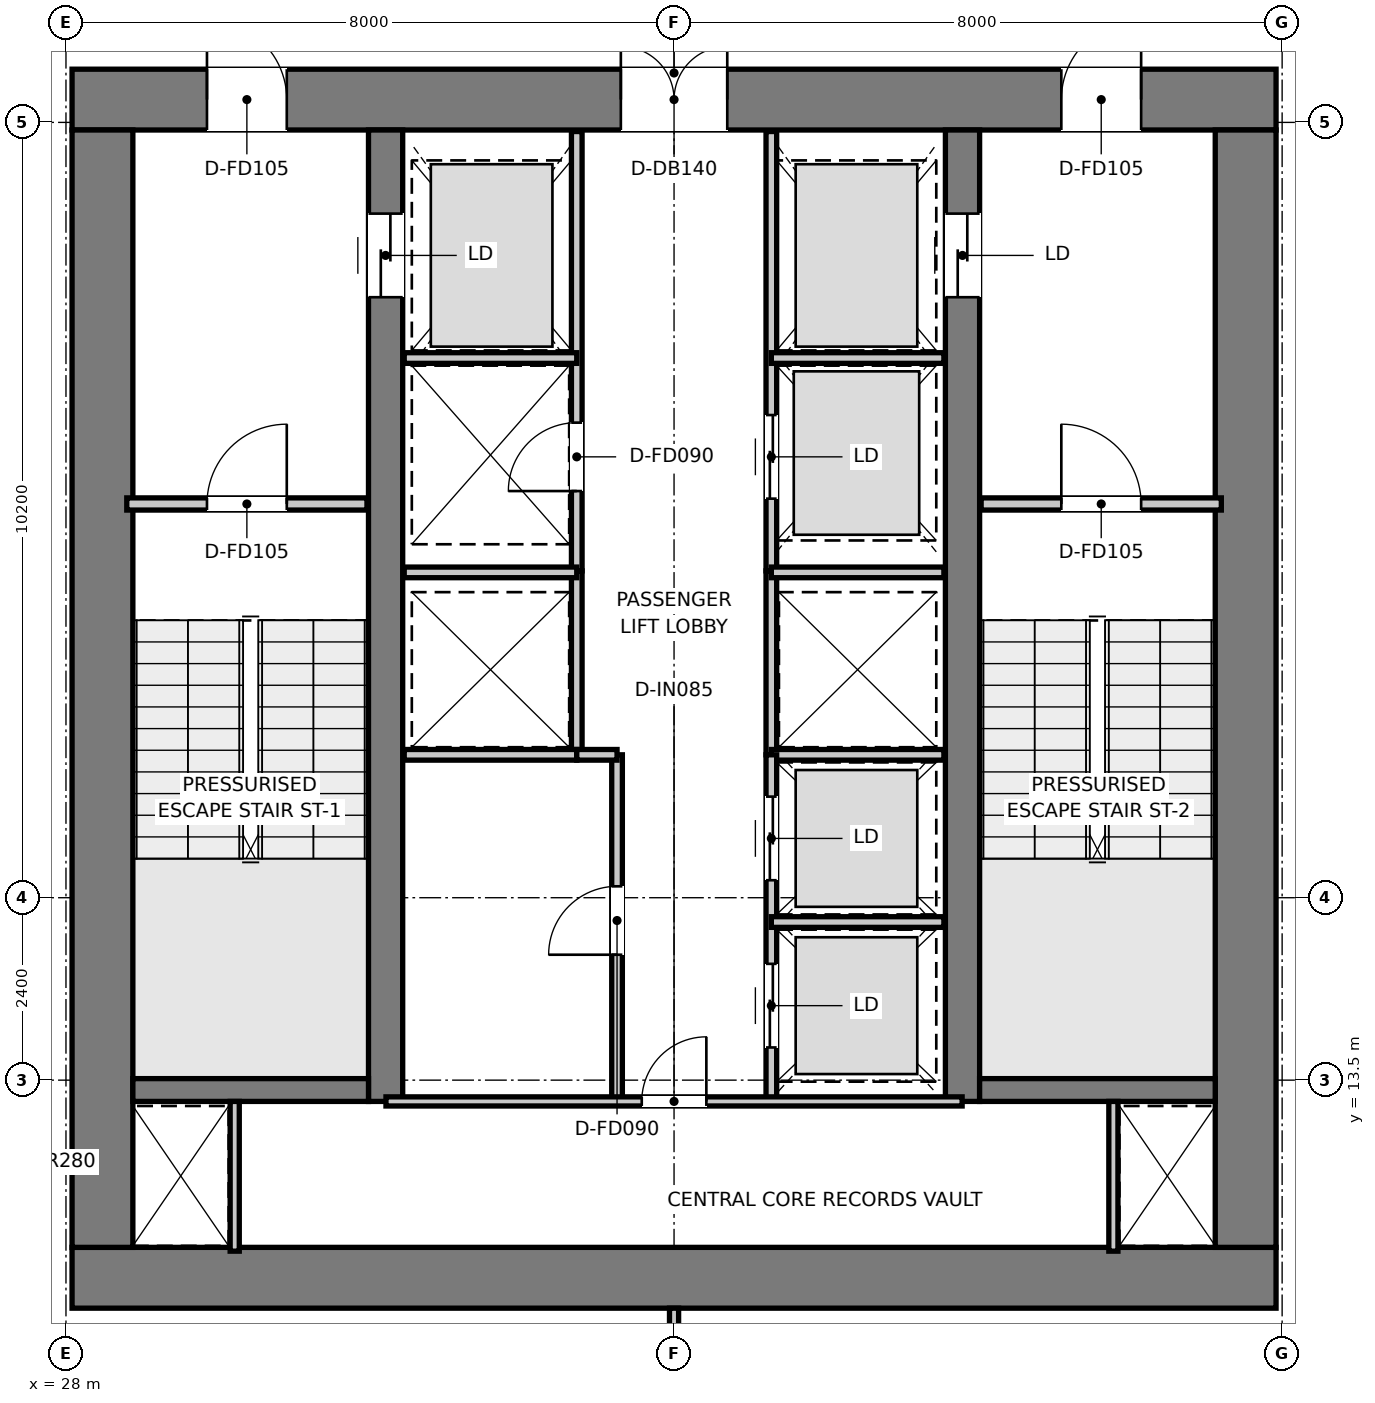
"""IFC4 building model, lengths in metres.
Left out: names, types, materials, properties, quantities, classifications, styles, units other than length and angle.
Written with IfcOpenShell. Run it as: python <this file> out.ifc"""

import sys

from ifc_helpers import new_model, si_unit, direction, frame, frame_2d, origin, place, context, subcontext, project, spatial, rectangle, extrude, element, fill, save


model = new_model("IFC4")
c1 = context("Model", 3, precision=1e-05, world=origin(), true_north=direction((0.0, 1.0)))
c2 = subcontext(c1, "Body", "Model", "MODEL_VIEW")
j1 = project(units=[si_unit("LENGTHUNIT", "METRE"), si_unit("PLANEANGLEUNIT", "RADIAN")], contexts=[c1])
p1 = place(None, origin())
s1 = spatial("IfcSite", under=j1, at=p1, CompositionType="ELEMENT")
p2 = place(p1, origin())
s2 = spatial("IfcBuilding", under=s1, at=p2, CompositionType="ELEMENT")
p3 = place(p2, frame((0.0, 0.0, 242.85)))
s3 = spatial("IfcBuildingStorey", under=s2, at=p3, CompositionType="ELEMENT", Elevation=242.85)
p4 = place(p3, frame((28.08, 10.9, 0.0), z_axis=(0.0, 0.0, 1.0), x_axis=(1.0, 0.0, 0.0)))
e1 = element("IfcWall", 1, at=p4, inside=s3, PredefinedType="SHEAR", context=c2, shape_type="SweptSolid", body=[
    extrude(rectangle(XDim=15.84, YDim=0.8, at=frame_2d((7.92, 0.0))), origin(), (0.0, 0.0, 1.0), 3.95),
])
p5 = place(p3, frame((28.08, 26.4, 0.0), z_axis=(0.0, 0.0, 1.0), x_axis=(1.0, 0.0, 0.0)))
e2 = element("IfcWall", 2, at=p5, inside=s3, PredefinedType="SHEAR", context=c2, shape_type="SweptSolid", body=[
    extrude(rectangle(XDim=15.84, YDim=0.8, at=frame_2d((7.92, 0.0))), origin(), (0.0, 0.0, 1.0), 3.95),
])
p6 = place(p5, frame((7.22, 0.0, 0.0)))
e3 = element("IfcOpeningElement", 3, at=p6, cuts=e2, PredefinedType="OPENING", context=c2, shape_type="SweptSolid", body=[
    extrude(rectangle(XDim=1.4, YDim=2.2, at=frame_2d((0.7, 1.1))), frame((0.0, 0.41, 0.0), z_axis=(0.0, -1.0, 0.0), x_axis=(1.0, 0.0, 0.0)), (0.0, 0.0, 1.0), 0.82),
])
p7 = place(p5, frame((1.775, 0.0, 0.0)))
e4 = element("IfcOpeningElement", 4, at=p7, cuts=e2, PredefinedType="OPENING", context=c2, shape_type="SweptSolid", body=[
    extrude(rectangle(XDim=1.05, YDim=2.1, at=frame_2d((0.525, 1.05))), frame((0.0, 0.41, 0.0), z_axis=(0.0, -1.0, 0.0), x_axis=(1.0, 0.0, 0.0)), (0.0, 0.0, 1.0), 0.82),
])
p8 = place(p5, frame((13.015, 0.0, 0.0)))
e5 = element("IfcOpeningElement", 5, at=p8, cuts=e2, PredefinedType="OPENING", context=c2, shape_type="SweptSolid", body=[
    extrude(rectangle(XDim=1.05, YDim=2.1, at=frame_2d((0.525, 1.05))), frame((0.0, 0.41, 0.0), z_axis=(0.0, -1.0, 0.0), x_axis=(1.0, 0.0, 0.0)), (0.0, 0.0, 1.0), 0.82),
])
for number, where, z_axis, x_axis in (
    (6, (28.48, 11.3, 0.0), (0.0, 0.0, 1.0), (0.0, 1.0, 0.0)),
    (7, (43.52, 11.3, 0.0), (0.0, 0.0, 1.0), (0.0, 1.0, 0.0)),
):
    element("IfcWall", number, at=place(p3, frame(where, z_axis=z_axis, x_axis=x_axis)), inside=s3, PredefinedType="SHEAR", context=c2, shape_type="SweptSolid", body=[
        extrude(rectangle(XDim=14.7, YDim=0.8, at=frame_2d((7.35, 0.0))), origin(), (0.0, 0.0, 1.0), 3.95),
    ])
p9 = place(p3, frame((32.205, 13.22, 0.0), z_axis=(0.0, 0.0, 1.0), x_axis=(0.0, 1.0, 0.0)))
e8 = element("IfcWall", 8, at=p9, inside=s3, PredefinedType="SHEAR", context=c2, shape_type="SweptSolid", body=[
    extrude(rectangle(XDim=12.78, YDim=0.45, at=frame_2d((6.39, 0.0))), origin(), (0.0, 0.0, 1.0), 3.95),
])
p10 = place(p9, frame((10.58, 0.0, 0.0)))
e9 = element("IfcOpeningElement", 9, at=p10, cuts=e8, PredefinedType="OPENING", context=c2, shape_type="SweptSolid", body=[
    extrude(rectangle(XDim=1.1, YDim=2.15, at=frame_2d((0.55, 1.075))), frame((0.0, 0.235, 0.0), z_axis=(0.0, -1.0, 0.0), x_axis=(1.0, 0.0, 0.0)), (0.0, 0.0, 1.0), 0.47),
])
p11 = place(p3, frame((39.795, 13.22, 0.0), z_axis=(0.0, 0.0, 1.0), x_axis=(0.0, 1.0, 0.0)))
e10 = element("IfcWall", 10, at=p11, inside=s3, PredefinedType="SHEAR", context=c2, shape_type="SweptSolid", body=[
    extrude(rectangle(XDim=12.78, YDim=0.45, at=frame_2d((6.39, 0.0))), origin(), (0.0, 0.0, 1.0), 3.95),
])
p12 = place(p11, frame((10.58, 0.0, 0.0)))
e11 = element("IfcOpeningElement", 11, at=p12, cuts=e10, PredefinedType="OPENING", context=c2, shape_type="SweptSolid", body=[
    extrude(rectangle(XDim=1.1, YDim=2.15, at=frame_2d((0.55, 1.075))), frame((0.0, 0.235, 0.0), z_axis=(0.0, -1.0, 0.0), x_axis=(1.0, 0.0, 0.0)), (0.0, 0.0, 1.0), 0.47),
])
for number, where, z_axis, x_axis in (
    (12, (28.88, 13.37, 0.0), (0.0, 0.0, 1.0), (1.0, 0.0, 0.0)),
    (13, (40.02, 13.37, 0.0), (0.0, 0.0, 1.0), (1.0, 0.0, 0.0)),
):
    element("IfcWall", number, at=place(p3, frame(where, z_axis=z_axis, x_axis=x_axis)), inside=s3, PredefinedType="SHEAR", context=c2, shape_type="SweptSolid", body=[
        extrude(rectangle(XDim=3.1, YDim=0.3, at=frame_2d((1.55, 0.0))), origin(), (0.0, 0.0, 1.0), 3.95),
    ])
p13 = place(p3, frame((28.8, 21.08, 0.0), z_axis=(0.0, 0.0, 1.0), x_axis=(1.0, 0.0, 0.0)))
e14 = element("IfcWall", 14, at=p13, inside=s3, PredefinedType="PARTITIONING", context=c2, shape_type="SweptSolid", body=[
    extrude(rectangle(XDim=3.16, YDim=0.16, at=frame_2d((1.58, 0.0))), origin(), (0.0, 0.0, 1.0), 3.67),
])
p14 = place(p13, frame((1.055, 0.0, 0.0)))
e15 = element("IfcOpeningElement", 15, at=p14, cuts=e14, PredefinedType="OPENING", context=c2, shape_type="SweptSolid", body=[
    extrude(rectangle(XDim=1.05, YDim=2.1, at=frame_2d((0.525, 1.05))), frame((0.0, 0.09, 0.0), z_axis=(0.0, -1.0, 0.0), x_axis=(1.0, 0.0, 0.0)), (0.0, 0.0, 1.0), 0.18),
])
p15 = place(p3, frame((40.04, 21.08, 0.0), z_axis=(0.0, 0.0, 1.0), x_axis=(1.0, 0.0, 0.0)))
e16 = element("IfcWall", 16, at=p15, inside=s3, PredefinedType="PARTITIONING", context=c2, shape_type="SweptSolid", body=[
    extrude(rectangle(XDim=3.16, YDim=0.16, at=frame_2d((1.58, 0.0))), origin(), (0.0, 0.0, 1.0), 3.67),
])
p16 = place(p15, frame((1.055, 0.0, 0.0)))
e17 = element("IfcOpeningElement", 17, at=p16, cuts=e16, PredefinedType="OPENING", context=c2, shape_type="SweptSolid", body=[
    extrude(rectangle(XDim=1.05, YDim=2.1, at=frame_2d((0.525, 1.05))), frame((0.0, 0.09, 0.0), z_axis=(0.0, -1.0, 0.0), x_axis=(1.0, 0.0, 0.0)), (0.0, 0.0, 1.0), 0.18),
])
p17 = place(p3, frame((34.72, 20.2, 0.0), z_axis=(0.0, 0.0, 1.0), x_axis=(0.0, 1.0, 0.0)))
e18 = element("IfcWall", 18, at=p17, inside=s3, PredefinedType="PARTITIONING", context=c2, shape_type="SweptSolid", body=[
    extrude(rectangle(XDim=5.78, YDim=0.14, at=frame_2d((2.89, 0.0))), origin(), (0.0, 0.0, 1.0), 2.82),
])
p18 = place(p17, frame((1.05, 0.0, 0.0)))
e19 = element("IfcOpeningElement", 19, at=p18, cuts=e18, PredefinedType="OPENING", context=c2, shape_type="SweptSolid", body=[
    extrude(rectangle(XDim=0.9, YDim=2.1, at=frame_2d((0.45, 1.05))), frame((0.0, 0.08, 0.0), z_axis=(0.0, -1.0, 0.0), x_axis=(1.0, 0.0, 0.0)), (0.0, 0.0, 1.0), 0.16),
])
p19 = place(p3, frame((37.28, 20.2, 0.0), z_axis=(0.0, 0.0, 1.0), x_axis=(0.0, 1.0, 0.0)))
e20 = element("IfcWall", 20, at=p19, inside=s3, PredefinedType="PARTITIONING", context=c2, shape_type="SweptSolid", body=[
    extrude(rectangle(XDim=5.78, YDim=0.14, at=frame_2d((2.89, 0.0))), origin(), (0.0, 0.0, 1.0), 2.82),
])
p20 = place(p19, frame((0.95, 0.0, 0.0)))
e21 = element("IfcOpeningElement", 21, at=p20, cuts=e20, PredefinedType="OPENING", context=c2, shape_type="SweptSolid", body=[
    extrude(rectangle(XDim=1.1, YDim=2.15, at=frame_2d((0.55, 1.075))), frame((0.0, 0.08, 0.0), z_axis=(0.0, -1.0, 0.0), x_axis=(1.0, 0.0, 0.0)), (0.0, 0.0, 1.0), 0.16),
])
for number, where, z_axis, x_axis in (
    (22, (32.45, 23.0, 0.0), (0.0, 0.0, 1.0), (1.0, 0.0, 0.0)),
    (23, (37.28, 23.0, 0.0), (0.0, 0.0, 1.0), (1.0, 0.0, 0.0)),
):
    element("IfcWall", number, at=place(p3, frame(where, z_axis=z_axis, x_axis=x_axis)), inside=s3, PredefinedType="PARTITIONING", context=c2, shape_type="SweptSolid", body=[
        extrude(rectangle(XDim=2.27, YDim=0.14, at=frame_2d((1.135, 0.0))), origin(), (0.0, 0.0, 1.0), 2.82),
    ])
for number, where, z_axis, x_axis in (
    (24, (34.72, 17.78, 0.0), (0.0, 0.0, 1.0), (0.0, 1.0, 0.0)),
    (25, (37.28, 17.78, 0.0), (0.0, 0.0, 1.0), (0.0, 1.0, 0.0)),
):
    element("IfcWall", number, at=place(p3, frame(where, z_axis=z_axis, x_axis=x_axis)), inside=s3, PredefinedType="PARTITIONING", context=c2, shape_type="SweptSolid", body=[
        extrude(rectangle(XDim=2.42, YDim=0.14, at=frame_2d((1.21, 0.0))), origin(), (0.0, 0.0, 1.0), 3.67),
    ])
for number, where, z_axis, x_axis in (
    (26, (32.45, 17.78, 0.0), (0.0, 0.0, 1.0), (1.0, 0.0, 0.0)),
    (27, (32.45, 20.18, 0.0), (0.0, 0.0, 1.0), (1.0, 0.0, 0.0)),
    (28, (37.28, 17.78, 0.0), (0.0, 0.0, 1.0), (1.0, 0.0, 0.0)),
    (29, (37.28, 20.18, 0.0), (0.0, 0.0, 1.0), (1.0, 0.0, 0.0)),
):
    element("IfcWall", number, at=place(p3, frame(where, z_axis=z_axis, x_axis=x_axis)), inside=s3, PredefinedType="PARTITIONING", context=c2, shape_type="SweptSolid", body=[
        extrude(rectangle(XDim=2.27, YDim=0.14, at=frame_2d((1.135, 0.0))), origin(), (0.0, 0.0, 1.0), 3.67),
    ])
p21 = place(p3, frame((35.25, 13.22, 0.0), z_axis=(0.0, 0.0, 1.0), x_axis=(0.0, 1.0, 0.0)))
e30 = element("IfcWall", 30, at=p21, inside=s3, PredefinedType="PARTITIONING", context=c2, shape_type="SweptSolid", body=[
    extrude(rectangle(XDim=4.56, YDim=0.14, at=frame_2d((2.28, 0.0))), origin(), (0.0, 0.0, 1.0), 3.67),
])
p22 = place(p21, frame((1.93, 0.0, 0.0)))
e31 = element("IfcOpeningElement", 31, at=p22, cuts=e30, PredefinedType="OPENING", context=c2, shape_type="SweptSolid", body=[
    extrude(rectangle(XDim=0.9, YDim=2.1, at=frame_2d((0.45, 1.05))), frame((0.0, 0.08, 0.0), z_axis=(0.0, -1.0, 0.0), x_axis=(1.0, 0.0, 0.0)), (0.0, 0.0, 1.0), 0.16),
])
p23 = place(p3, frame((34.72, 17.78, 0.0), z_axis=(0.0, 0.0, 1.0), x_axis=(1.0, 0.0, 0.0)))
e32 = element("IfcWall", 32, at=p23, inside=s3, PredefinedType="PARTITIONING", context=c2, shape_type="SweptSolid", body=[
    extrude(rectangle(XDim=0.53, YDim=0.14, at=frame_2d((0.265, 0.0))), origin(), (0.0, 0.0, 1.0), 3.67),
])
p24 = place(p3, frame((37.28, 13.22, 0.0), z_axis=(0.0, 0.0, 1.0), x_axis=(0.0, 1.0, 0.0)))
e33 = element("IfcWall", 33, at=p24, inside=s3, PredefinedType="PARTITIONING", context=c2, shape_type="SweptSolid", body=[
    extrude(rectangle(XDim=4.56, YDim=0.14, at=frame_2d((2.28, 0.0))), origin(), (0.0, 0.0, 1.0), 3.67),
])
p25 = place(p24, frame((0.71, 0.0, 0.0)))
e34 = element("IfcOpeningElement", 34, at=p25, cuts=e33, PredefinedType="OPENING", context=c2, shape_type="SweptSolid", body=[
    extrude(rectangle(XDim=1.1, YDim=2.15, at=frame_2d((0.55, 1.075))), frame((0.0, 0.08, 0.0), z_axis=(0.0, -1.0, 0.0), x_axis=(1.0, 0.0, 0.0)), (0.0, 0.0, 1.0), 0.16),
])
p26 = place(p24, frame((2.91, 0.0, 0.0)))
e35 = element("IfcOpeningElement", 35, at=p26, cuts=e33, PredefinedType="OPENING", context=c2, shape_type="SweptSolid", body=[
    extrude(rectangle(XDim=1.1, YDim=2.15, at=frame_2d((0.55, 1.075))), frame((0.0, 0.08, 0.0), z_axis=(0.0, -1.0, 0.0), x_axis=(1.0, 0.0, 0.0)), (0.0, 0.0, 1.0), 0.16),
])
p27 = place(p3, frame((37.28, 15.58, 0.0), z_axis=(0.0, 0.0, 1.0), x_axis=(1.0, 0.0, 0.0)))
e36 = element("IfcWall", 36, at=p27, inside=s3, PredefinedType="PARTITIONING", context=c2, shape_type="SweptSolid", body=[
    extrude(rectangle(XDim=2.27, YDim=0.14, at=frame_2d((1.135, 0.0))), origin(), (0.0, 0.0, 1.0), 3.67),
])
for number, where, z_axis, x_axis in (
    (37, (30.22, 11.25, 0.0), (0.0, 0.0, 1.0), (0.0, 1.0, 0.0)),
    (38, (41.78, 11.25, 0.0), (0.0, 0.0, 1.0), (0.0, 1.0, 0.0)),
):
    element("IfcWall", number, at=place(p3, frame(where, z_axis=z_axis, x_axis=x_axis)), inside=s3, PredefinedType="PARTITIONING", context=c2, shape_type="SweptSolid", body=[
        extrude(rectangle(XDim=1.97, YDim=0.12, at=frame_2d((0.985, 0.0))), origin(), (0.0, 0.0, 1.0), 3.67),
    ])
p28 = place(p3, frame((32.21, 13.22, 0.0), z_axis=(0.0, 0.0, 1.0), x_axis=(1.0, 0.0, 0.0)))
e39 = element("IfcWall", 39, at=p28, inside=s3, PredefinedType="PARTITIONING", context=c2, shape_type="SweptSolid", body=[
    extrude(rectangle(XDim=7.58, YDim=0.12, at=frame_2d((3.79, 0.0))), origin(), (0.0, 0.0, 1.0), 3.67),
])
p29 = place(p28, frame((3.365, 0.0, 0.0)))
e40 = element("IfcOpeningElement", 40, at=p29, cuts=e39, PredefinedType="OPENING", context=c2, shape_type="SweptSolid", body=[
    extrude(rectangle(XDim=0.85, YDim=2.1, at=frame_2d((0.425, 1.05))), frame((0.0, 0.07, 0.0), z_axis=(0.0, -1.0, 0.0), x_axis=(1.0, 0.0, 0.0)), (0.0, 0.0, 1.0), 0.14),
])
p30 = place(p3, frame((36.0, 4.407, 0.0), z_axis=(0.0, 0.0, 1.0), x_axis=(0.0, 1.0, 0.0)))
e41 = element("IfcWall", 41, at=p30, inside=s3, PredefinedType="PARTITIONING", context=c2, shape_type="SweptSolid", body=[
    extrude(rectangle(XDim=6.093, YDim=0.12, at=frame_2d((3.047, 0.0))), origin(), (0.0, 0.0, 1.0), 3.67),
])
p31 = place(p14, origin())
e42 = element("IfcDoor", 42, at=p31, inside=s3, OperationType="SINGLE_SWING_RIGHT", PredefinedType="DOOR", context=c2, shape_type="SweptSolid", body=[
    extrude(rectangle(XDim=1.05, YDim=2.1, at=frame_2d((0.525, 1.05))), frame((0.0, 0.025, 0.0), z_axis=(0.0, -1.0, 0.0), x_axis=(1.0, 0.0, 0.0)), (0.0, 0.0, 1.0), 0.05),
])
fill(e15, e42)
p32 = place(p16, origin())
e43 = element("IfcDoor", 43, at=p32, inside=s3, OperationType="SINGLE_SWING_LEFT", PredefinedType="DOOR", context=c2, shape_type="SweptSolid", body=[
    extrude(rectangle(XDim=1.05, YDim=2.1, at=frame_2d((0.525, 1.05))), frame((0.0, 0.025, 0.0), z_axis=(0.0, -1.0, 0.0), x_axis=(1.0, 0.0, 0.0)), (0.0, 0.0, 1.0), 0.05),
])
fill(e17, e43)
p33 = place(p6, origin())
e44 = element("IfcDoor", 44, at=p33, inside=s3, OperationType="DOUBLE_DOOR_SINGLE_SWING", PredefinedType="DOOR", context=c2, shape_type="SweptSolid", body=[
    extrude(rectangle(XDim=1.4, YDim=2.2, at=frame_2d((0.7, 1.1))), frame((0.0, 0.025, 0.0), z_axis=(0.0, -1.0, 0.0), x_axis=(1.0, 0.0, 0.0)), (0.0, 0.0, 1.0), 0.05),
])
fill(e3, e44)
p34 = place(p7, origin())
e45 = element("IfcDoor", 45, at=p34, inside=s3, OperationType="SINGLE_SWING_LEFT", PredefinedType="DOOR", context=c2, shape_type="SweptSolid", body=[
    extrude(rectangle(XDim=1.05, YDim=2.1, at=frame_2d((0.525, 1.05))), frame((0.0, 0.025, 0.0), z_axis=(0.0, -1.0, 0.0), x_axis=(1.0, 0.0, 0.0)), (0.0, 0.0, 1.0), 0.05),
])
fill(e4, e45)
p35 = place(p8, origin())
e46 = element("IfcDoor", 46, at=p35, inside=s3, OperationType="SINGLE_SWING_RIGHT", PredefinedType="DOOR", context=c2, shape_type="SweptSolid", body=[
    extrude(rectangle(XDim=1.05, YDim=2.1, at=frame_2d((0.525, 1.05))), frame((0.0, 0.025, 0.0), z_axis=(0.0, -1.0, 0.0), x_axis=(1.0, 0.0, 0.0)), (0.0, 0.0, 1.0), 0.05),
])
fill(e5, e46)
p36 = place(p10, origin())
e47 = element("IfcDoor", 47, at=p36, inside=s3, OperationType="DOUBLE_DOOR_SLIDING", PredefinedType="DOOR", context=c2, shape_type="SweptSolid", body=[
    extrude(rectangle(XDim=1.1, YDim=2.15, at=frame_2d((0.55, 1.075))), frame((0.0, 0.025, 0.0), z_axis=(0.0, -1.0, 0.0), x_axis=(1.0, 0.0, 0.0)), (0.0, 0.0, 1.0), 0.05),
])
fill(e9, e47)
p37 = place(p12, origin())
e48 = element("IfcDoor", 48, at=p37, inside=s3, OperationType="DOUBLE_DOOR_SLIDING", PredefinedType="DOOR", context=c2, shape_type="SweptSolid", body=[
    extrude(rectangle(XDim=1.1, YDim=2.15, at=frame_2d((0.55, 1.075))), frame((0.0, 0.025, 0.0), z_axis=(0.0, -1.0, 0.0), x_axis=(1.0, 0.0, 0.0)), (0.0, 0.0, 1.0), 0.05),
])
fill(e11, e48)
p38 = place(p18, origin())
e49 = element("IfcDoor", 49, at=p38, inside=s3, OperationType="SINGLE_SWING_LEFT", PredefinedType="DOOR", context=c2, shape_type="SweptSolid", body=[
    extrude(rectangle(XDim=0.9, YDim=2.1, at=frame_2d((0.45, 1.05))), frame((0.0, 0.025, 0.0), z_axis=(0.0, -1.0, 0.0), x_axis=(1.0, 0.0, 0.0)), (0.0, 0.0, 1.0), 0.05),
])
fill(e19, e49)
p39 = place(p20, origin())
e50 = element("IfcDoor", 50, at=p39, inside=s3, OperationType="DOUBLE_DOOR_SLIDING", PredefinedType="DOOR", context=c2, shape_type="SweptSolid", body=[
    extrude(rectangle(XDim=1.1, YDim=2.15, at=frame_2d((0.55, 1.075))), frame((0.0, 0.025, 0.0), z_axis=(0.0, -1.0, 0.0), x_axis=(1.0, 0.0, 0.0)), (0.0, 0.0, 1.0), 0.05),
])
fill(e21, e50)
p40 = place(p22, origin())
e51 = element("IfcDoor", 51, at=p40, inside=s3, OperationType="SINGLE_SWING_LEFT", PredefinedType="DOOR", context=c2, shape_type="SweptSolid", body=[
    extrude(rectangle(XDim=0.9, YDim=2.1, at=frame_2d((0.45, 1.05))), frame((0.0, 0.025, 0.0), z_axis=(0.0, -1.0, 0.0), x_axis=(1.0, 0.0, 0.0)), (0.0, 0.0, 1.0), 0.05),
])
fill(e31, e51)
p41 = place(p25, origin())
e52 = element("IfcDoor", 52, at=p41, inside=s3, OperationType="DOUBLE_DOOR_SLIDING", PredefinedType="DOOR", context=c2, shape_type="SweptSolid", body=[
    extrude(rectangle(XDim=1.1, YDim=2.15, at=frame_2d((0.55, 1.075))), frame((0.0, 0.025, 0.0), z_axis=(0.0, -1.0, 0.0), x_axis=(1.0, 0.0, 0.0)), (0.0, 0.0, 1.0), 0.05),
])
fill(e34, e52)
p42 = place(p26, origin())
e53 = element("IfcDoor", 53, at=p42, inside=s3, OperationType="DOUBLE_DOOR_SLIDING", PredefinedType="DOOR", context=c2, shape_type="SweptSolid", body=[
    extrude(rectangle(XDim=1.1, YDim=2.15, at=frame_2d((0.55, 1.075))), frame((0.0, 0.025, 0.0), z_axis=(0.0, -1.0, 0.0), x_axis=(1.0, 0.0, 0.0)), (0.0, 0.0, 1.0), 0.05),
])
fill(e35, e53)
p43 = place(p29, origin())
e54 = element("IfcDoor", 54, at=p43, inside=s3, OperationType="SINGLE_SWING_RIGHT", PredefinedType="DOOR", context=c2, shape_type="SweptSolid", body=[
    extrude(rectangle(XDim=0.85, YDim=2.1, at=frame_2d((0.425, 1.05))), frame((0.0, 0.025, 0.0), z_axis=(0.0, -1.0, 0.0), x_axis=(1.0, 0.0, 0.0)), (0.0, 0.0, 1.0), 0.05),
])
fill(e40, e54)
save(model, sys.argv[1])
